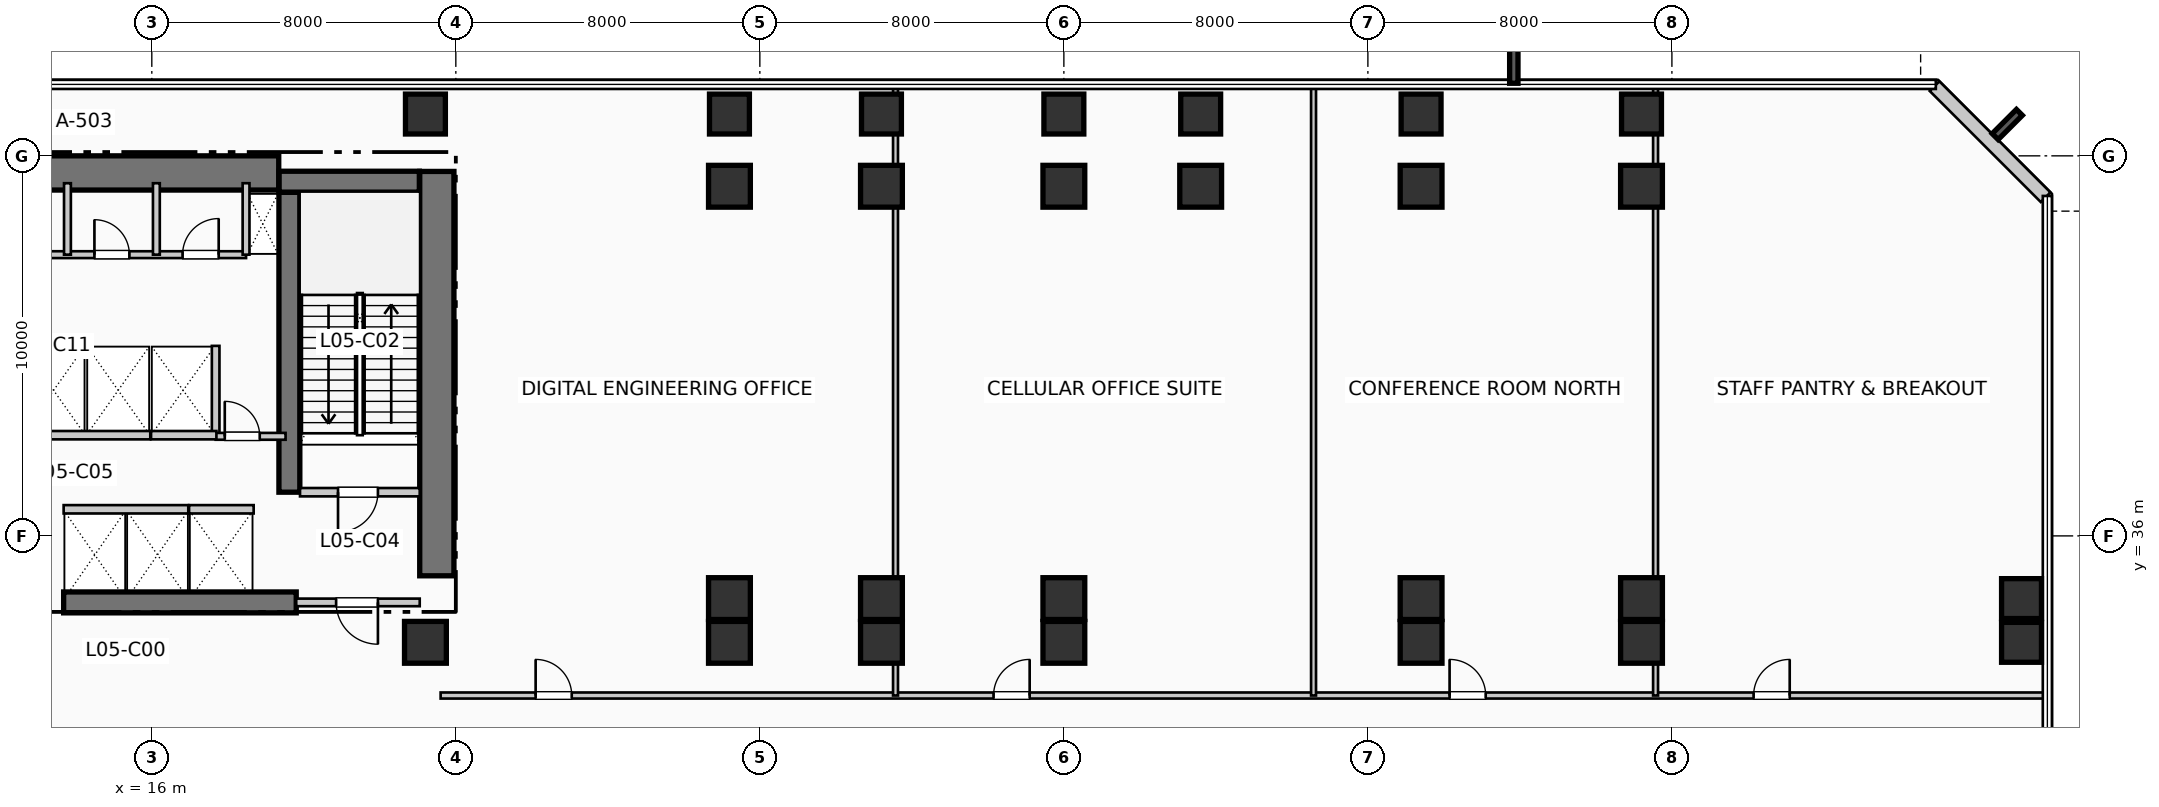
"""IFC4 building model, lengths in metres.
Left out: names, types, materials, properties, quantities, classifications, styles, units other than length and angle.
Written with IfcOpenShell. Run it as: python <this file> out.ifc"""

import sys

from ifc_helpers import new_model, si_unit, direction, frame, frame_2d, origin, origin_2d, place, context, subcontext, project, spatial, rectangle, extrude, element, fill, save


model = new_model("IFC4")
c1 = context("Model", 3, precision=1e-05, world=origin(), true_north=direction((0.0, 1.0)))
c2 = subcontext(c1, "Body", "Model", "MODEL_VIEW")
j1 = project(units=[si_unit("LENGTHUNIT", "METRE"), si_unit("PLANEANGLEUNIT", "RADIAN")], contexts=[c1])
p1 = place(None, origin())
s1 = spatial("IfcSite", under=j1, at=p1, CompositionType="ELEMENT")
p2 = place(p1, origin())
s2 = spatial("IfcBuilding", under=s1, at=p2, CompositionType="ELEMENT")
p3 = place(p2, frame((0.0, 0.0, 25.74)))
s3 = spatial("IfcBuildingStorey", under=s2, at=p3, CompositionType="ELEMENT", Elevation=25.74)
p4 = place(p3, frame((5.36, 45.55, 0.0), z_axis=(0.0, 0.0, 1.0), x_axis=(1.0, 0.0, 0.0)))
e1 = element("IfcWall", 1, at=p4, inside=s3, PredefinedType="SHEAR", context=c2, shape_type="SweptSolid", body=[
    extrude(rectangle(XDim=13.98, YDim=0.9, at=frame_2d((6.99, 0.0))), origin(), (0.0, 0.0, 1.0), 4.62),
])
p5 = place(p3, frame((23.5, 34.95, 0.0), z_axis=(0.0, 0.0, 1.0), x_axis=(0.0, 1.0, 0.0)))
e2 = element("IfcWall", 2, at=p5, inside=s3, PredefinedType="SHEAR", context=c2, shape_type="SweptSolid", body=[
    extrude(rectangle(XDim=10.64, YDim=0.9, at=frame_2d((5.32, 0.0))), origin(), (0.0, 0.0, 1.0), 4.62),
])
p6 = place(p3, frame((13.68, 34.25, 0.0), z_axis=(0.0, 0.0, 1.0), x_axis=(1.0, 0.0, 0.0)))
e3 = element("IfcWall", 3, at=p6, inside=s3, PredefinedType="SHEAR", context=c2, shape_type="SweptSolid", body=[
    extrude(rectangle(XDim=6.12, YDim=0.55, at=frame_2d((3.06, 0.0))), origin(), (0.0, 0.0, 1.0), 4.62),
])
p7 = place(p3, frame((19.62, 37.15, 0.0), z_axis=(0.0, 0.0, 1.0), x_axis=(0.0, 1.0, 0.0)))
e4 = element("IfcWall", 4, at=p7, inside=s3, PredefinedType="SHEAR", context=c2, shape_type="SweptSolid", body=[
    extrude(rectangle(XDim=7.89, YDim=0.55, at=frame_2d((3.945, 0.0))), origin(), (0.0, 0.0, 1.0), 4.62),
])
p8 = place(p3, frame((19.35, 45.32, 0.0), z_axis=(0.0, 0.0, 1.0), x_axis=(1.0, 0.0, 0.0)))
e5 = element("IfcWall", 5, at=p8, inside=s3, PredefinedType="SHEAR", context=c2, shape_type="SweptSolid", body=[
    extrude(rectangle(XDim=3.69, YDim=0.55, at=frame_2d((1.845, 0.0))), origin(), (0.0, 0.0, 1.0), 4.62),
])
p9 = place(p3, frame((23.2, 33.2, 0.0), z_axis=(0.0, 0.0, 1.0), x_axis=(1.0, 0.0, 0.0)))
e6 = element("IfcColumn", 6, at=p9, inside=s3, PredefinedType="COLUMN", context=c2, shape_type="SweptSolid", body=[
    extrude(rectangle(XDim=1.1, YDim=1.1, at=origin_2d()), origin(), (0.0, 0.0, 1.0), 4.62),
])
p10 = place(p3, frame((23.2, 47.1, 0.0), z_axis=(0.0, 0.0, 1.0), x_axis=(1.0, 0.0, 0.0)))
e7 = element("IfcColumn", 7, at=p10, inside=s3, PredefinedType="COLUMN", context=c2, shape_type="SweptSolid", body=[
    extrude(rectangle(XDim=1.05, YDim=1.05, at=origin_2d()), origin(), (0.0, 0.0, 1.0), 4.62),
])
for number, where, z_axis, x_axis in (
    (8, (31.2, 33.2, 0.0), (0.0, 0.0, 1.0), (1.0, 0.0, 0.0)),
    (9, (31.2, 34.35, 0.0), (0.0, 0.0, 1.0), (1.0, 0.0, 0.0)),
    (10, (31.2, 45.2, 0.0), (0.0, 0.0, 1.0), (1.0, 0.0, 0.0)),
):
    element("IfcColumn", number, at=place(p3, frame(where, z_axis=z_axis, x_axis=x_axis)), inside=s3, PredefinedType="COLUMN", context=c2, shape_type="SweptSolid", body=[
        extrude(rectangle(XDim=1.1, YDim=1.1, at=origin_2d()), origin(), (0.0, 0.0, 1.0), 4.62),
    ])
p11 = place(p3, frame((31.2, 47.1, 0.0), z_axis=(0.0, 0.0, 1.0), x_axis=(1.0, 0.0, 0.0)))
e11 = element("IfcColumn", 11, at=p11, inside=s3, PredefinedType="COLUMN", context=c2, shape_type="SweptSolid", body=[
    extrude(rectangle(XDim=1.05, YDim=1.05, at=origin_2d()), origin(), (0.0, 0.0, 1.0), 4.62),
])
for number, where, z_axis, x_axis in (
    (12, (35.2, 33.2, 0.0), (0.0, 0.0, 1.0), (1.0, 0.0, 0.0)),
    (13, (35.2, 34.35, 0.0), (0.0, 0.0, 1.0), (1.0, 0.0, 0.0)),
    (14, (35.2, 45.2, 0.0), (0.0, 0.0, 1.0), (1.0, 0.0, 0.0)),
):
    element("IfcColumn", number, at=place(p3, frame(where, z_axis=z_axis, x_axis=x_axis)), inside=s3, PredefinedType="COLUMN", context=c2, shape_type="SweptSolid", body=[
        extrude(rectangle(XDim=1.1, YDim=1.1, at=origin_2d()), origin(), (0.0, 0.0, 1.0), 4.62),
    ])
p12 = place(p3, frame((35.2, 47.1, 0.0), z_axis=(0.0, 0.0, 1.0), x_axis=(1.0, 0.0, 0.0)))
e15 = element("IfcColumn", 15, at=p12, inside=s3, PredefinedType="COLUMN", context=c2, shape_type="SweptSolid", body=[
    extrude(rectangle(XDim=1.05, YDim=1.05, at=origin_2d()), origin(), (0.0, 0.0, 1.0), 4.62),
])
for number, where, z_axis, x_axis in (
    (16, (40.0, 33.2, 0.0), (0.0, 0.0, 1.0), (1.0, 0.0, 0.0)),
    (17, (40.0, 34.35, 0.0), (0.0, 0.0, 1.0), (1.0, 0.0, 0.0)),
    (18, (40.0, 45.2, 0.0), (0.0, 0.0, 1.0), (1.0, 0.0, 0.0)),
):
    element("IfcColumn", number, at=place(p3, frame(where, z_axis=z_axis, x_axis=x_axis)), inside=s3, PredefinedType="COLUMN", context=c2, shape_type="SweptSolid", body=[
        extrude(rectangle(XDim=1.1, YDim=1.1, at=origin_2d()), origin(), (0.0, 0.0, 1.0), 4.62),
    ])
p13 = place(p3, frame((40.0, 47.1, 0.0), z_axis=(0.0, 0.0, 1.0), x_axis=(1.0, 0.0, 0.0)))
e19 = element("IfcColumn", 19, at=p13, inside=s3, PredefinedType="COLUMN", context=c2, shape_type="SweptSolid", body=[
    extrude(rectangle(XDim=1.05, YDim=1.05, at=origin_2d()), origin(), (0.0, 0.0, 1.0), 4.62),
])
p14 = place(p3, frame((43.6, 45.2, 0.0), z_axis=(0.0, 0.0, 1.0), x_axis=(1.0, 0.0, 0.0)))
e20 = element("IfcColumn", 20, at=p14, inside=s3, PredefinedType="COLUMN", context=c2, shape_type="SweptSolid", body=[
    extrude(rectangle(XDim=1.1, YDim=1.1, at=origin_2d()), origin(), (0.0, 0.0, 1.0), 4.62),
])
p15 = place(p3, frame((43.6, 47.1, 0.0), z_axis=(0.0, 0.0, 1.0), x_axis=(1.0, 0.0, 0.0)))
e21 = element("IfcColumn", 21, at=p15, inside=s3, PredefinedType="COLUMN", context=c2, shape_type="SweptSolid", body=[
    extrude(rectangle(XDim=1.05, YDim=1.05, at=origin_2d()), origin(), (0.0, 0.0, 1.0), 4.62),
])
for number, where, z_axis, x_axis in (
    (22, (49.4, 33.2, 0.0), (0.0, 0.0, 1.0), (1.0, 0.0, 0.0)),
    (23, (49.4, 34.35, 0.0), (0.0, 0.0, 1.0), (1.0, 0.0, 0.0)),
    (24, (49.4, 45.2, 0.0), (0.0, 0.0, 1.0), (1.0, 0.0, 0.0)),
):
    element("IfcColumn", number, at=place(p3, frame(where, z_axis=z_axis, x_axis=x_axis)), inside=s3, PredefinedType="COLUMN", context=c2, shape_type="SweptSolid", body=[
        extrude(rectangle(XDim=1.1, YDim=1.1, at=origin_2d()), origin(), (0.0, 0.0, 1.0), 4.62),
    ])
p16 = place(p3, frame((49.4, 47.1, 0.0), z_axis=(0.0, 0.0, 1.0), x_axis=(1.0, 0.0, 0.0)))
e25 = element("IfcColumn", 25, at=p16, inside=s3, PredefinedType="COLUMN", context=c2, shape_type="SweptSolid", body=[
    extrude(rectangle(XDim=1.05, YDim=1.05, at=origin_2d()), origin(), (0.0, 0.0, 1.0), 4.62),
])
for number, where, z_axis, x_axis in (
    (26, (55.2, 33.2, 0.0), (0.0, 0.0, 1.0), (1.0, 0.0, 0.0)),
    (27, (55.2, 34.35, 0.0), (0.0, 0.0, 1.0), (1.0, 0.0, 0.0)),
    (28, (55.2, 45.2, 0.0), (0.0, 0.0, 1.0), (1.0, 0.0, 0.0)),
):
    element("IfcColumn", number, at=place(p3, frame(where, z_axis=z_axis, x_axis=x_axis)), inside=s3, PredefinedType="COLUMN", context=c2, shape_type="SweptSolid", body=[
        extrude(rectangle(XDim=1.1, YDim=1.1, at=origin_2d()), origin(), (0.0, 0.0, 1.0), 4.62),
    ])
for number, where, z_axis, x_axis in (
    (29, (55.2, 47.1, 0.0), (0.0, 0.0, 1.0), (1.0, 0.0, 0.0)),
    (30, (65.2, 33.2, 0.0), (0.0, 0.0, 1.0), (1.0, 0.0, 0.0)),
    (31, (65.2, 34.35, 0.0), (0.0, 0.0, 1.0), (1.0, 0.0, 0.0)),
):
    element("IfcColumn", number, at=place(p3, frame(where, z_axis=z_axis, x_axis=x_axis)), inside=s3, PredefinedType="COLUMN", context=c2, shape_type="SweptSolid", body=[
        extrude(rectangle(XDim=1.05, YDim=1.05, at=origin_2d()), origin(), (0.0, 0.0, 1.0), 4.62),
    ])
p17 = place(p3, frame((65.834, 44.912, 0.0), z_axis=(0.0, 0.0, 1.0), x_axis=(-0.707106781187, 0.707106781187, 0.0)))
e32 = element("IfcWall", 32, at=p17, inside=s3, PredefinedType="SOLIDWALL", context=c2, shape_type="SweptSolid", body=[
    extrude(rectangle(XDim=4.133, YDim=0.36, at=frame_2d((2.066, 0.0))), origin(), (0.0, 0.0, 1.0), 4.37),
])
p18 = place(p3, frame((19.9, 37.15, 0.0), z_axis=(0.0, 0.0, 1.0), x_axis=(1.0, 0.0, 0.0)))
e33 = element("IfcWall", 33, at=p18, inside=s3, PredefinedType="PARTITIONING", context=c2, shape_type="SweptSolid", body=[
    extrude(rectangle(XDim=3.15, YDim=0.22, at=frame_2d((1.575, 0.0))), origin(), (0.0, 0.0, 1.0), 4.37),
])
p19 = place(p18, frame((2.05, 0.0, 0.0), z_axis=(0.0, 0.0, 1.0), x_axis=(-1.0, 0.0, 0.0)))
e34 = element("IfcOpeningElement", 34, at=p19, cuts=e33, PredefinedType="OPENING", context=c2, shape_type="SweptSolid", body=[
    extrude(rectangle(XDim=1.05, YDim=2.15, at=frame_2d((0.525, 1.075))), frame((0.0, 0.12, 0.0), z_axis=(0.0, -1.0, 0.0), x_axis=(1.0, 0.0, 0.0)), (0.0, 0.0, 1.0), 0.24),
])
p20 = place(p3, frame((19.8, 34.25, 0.0), z_axis=(0.0, 0.0, 1.0), x_axis=(1.0, 0.0, 0.0)))
e35 = element("IfcWall", 35, at=p20, inside=s3, PredefinedType="PARTITIONING", context=c2, shape_type="SweptSolid", body=[
    extrude(rectangle(XDim=3.25, YDim=0.2, at=frame_2d((1.625, 0.0))), origin(), (0.0, 0.0, 1.0), 4.37),
])
p21 = place(p20, frame((2.15, 0.0, 0.0), z_axis=(0.0, 0.0, 1.0), x_axis=(-1.0, 0.0, 0.0)))
e36 = element("IfcOpeningElement", 36, at=p21, cuts=e35, PredefinedType="OPENING", context=c2, shape_type="SweptSolid", body=[
    extrude(rectangle(XDim=1.1, YDim=2.15, at=frame_2d((0.55, 1.075))), frame((0.0, 0.11, 0.0), z_axis=(0.0, -1.0, 0.0), x_axis=(1.0, 0.0, 0.0)), (0.0, 0.0, 1.0), 0.22),
])
p22 = place(p3, frame((17.68, 38.65, 0.0), z_axis=(0.0, 0.0, 1.0), x_axis=(0.0, 1.0, 0.0)))
e37 = element("IfcWall", 37, at=p22, inside=s3, PredefinedType="PARTITIONING", context=c2, shape_type="SweptSolid", body=[
    extrude(rectangle(XDim=2.35, YDim=0.2, at=frame_2d((1.175, 0.0))), origin(), (0.0, 0.0, 1.0), 4.37),
])
p23 = place(p3, frame((17.68, 38.62, 0.0), z_axis=(0.0, 0.0, 1.0), x_axis=(1.0, 0.0, 0.0)))
e38 = element("IfcWall", 38, at=p23, inside=s3, PredefinedType="PARTITIONING", context=c2, shape_type="SweptSolid", body=[
    extrude(rectangle(XDim=1.84, YDim=0.18, at=frame_2d((0.92, 0.0))), origin(), (0.0, 0.0, 1.0), 4.37),
])
p24 = place(p23, frame((0.24, 0.0, 0.0)))
e39 = element("IfcOpeningElement", 39, at=p24, cuts=e38, PredefinedType="OPENING", context=c2, shape_type="SweptSolid", body=[
    extrude(rectangle(XDim=0.92, YDim=2.1, at=frame_2d((0.46, 1.05))), frame((0.0, 0.1, 0.0), z_axis=(0.0, -1.0, 0.0), x_axis=(1.0, 0.0, 0.0)), (0.0, 0.0, 1.0), 0.2),
])
p25 = place(p3, frame((13.68, 36.7, 0.0), z_axis=(0.0, 0.0, 1.0), x_axis=(1.0, 0.0, 0.0)))
e40 = element("IfcWall", 40, at=p25, inside=s3, PredefinedType="PARTITIONING", context=c2, shape_type="SweptSolid", body=[
    extrude(rectangle(XDim=3.28, YDim=0.22, at=frame_2d((1.64, 0.0))), origin(), (0.0, 0.0, 1.0), 4.37),
])
p26 = place(p3, frame((12.58, 38.65, 0.0), z_axis=(0.0, 0.0, 1.0), x_axis=(1.0, 0.0, 0.0)))
e41 = element("IfcWall", 41, at=p26, inside=s3, PredefinedType="PARTITIONING", context=c2, shape_type="SweptSolid", body=[
    extrude(rectangle(XDim=3.38, YDim=0.22, at=frame_2d((1.69, 0.0))), origin(), (0.0, 0.0, 1.0), 4.37),
])
p27 = place(p3, frame((16.98, 36.7, 0.0), z_axis=(0.0, 0.0, 1.0), x_axis=(1.0, 0.0, 0.0)))
e42 = element("IfcWall", 42, at=p27, inside=s3, PredefinedType="PARTITIONING", context=c2, shape_type="SweptSolid", body=[
    extrude(rectangle(XDim=1.7, YDim=0.22, at=frame_2d((0.85, 0.0))), origin(), (0.0, 0.0, 1.0), 4.37),
])
p28 = place(p3, frame((15.98, 38.65, 0.0), z_axis=(0.0, 0.0, 1.0), x_axis=(1.0, 0.0, 0.0)))
e43 = element("IfcWall", 43, at=p28, inside=s3, PredefinedType="PARTITIONING", context=c2, shape_type="SweptSolid", body=[
    extrude(rectangle(XDim=1.72, YDim=0.22, at=frame_2d((0.86, 0.0))), origin(), (0.0, 0.0, 1.0), 4.37),
])
p29 = place(p3, frame((9.15, 43.4, 0.0), z_axis=(0.0, 0.0, 1.0), x_axis=(1.0, 0.0, 0.0)))
e44 = element("IfcWall", 44, at=p29, inside=s3, PredefinedType="PLUMBINGWALL", context=c2, shape_type="SweptSolid", body=[
    extrude(rectangle(XDim=9.33, YDim=0.18, at=frame_2d((4.665, 0.0))), origin(), (0.0, 0.0, 1.0), 4.37),
])
p30 = place(p29, frame((0.72, 0.0, 0.0)))
e45 = element("IfcOpeningElement", 45, at=p30, cuts=e44, PredefinedType="OPENING", context=c2, shape_type="SweptSolid", body=[
    extrude(rectangle(XDim=0.92, YDim=2.1, at=frame_2d((0.46, 1.05))), frame((0.0, 0.1, 0.0), z_axis=(0.0, -1.0, 0.0), x_axis=(1.0, 0.0, 0.0)), (0.0, 0.0, 1.0), 0.2),
])
p31 = place(p29, frame((3.02, 0.0, 0.0)))
e46 = element("IfcOpeningElement", 46, at=p31, cuts=e44, PredefinedType="OPENING", context=c2, shape_type="SweptSolid", body=[
    extrude(rectangle(XDim=0.92, YDim=2.1, at=frame_2d((0.46, 1.05))), frame((0.0, 0.1, 0.0), z_axis=(0.0, -1.0, 0.0), x_axis=(1.0, 0.0, 0.0)), (0.0, 0.0, 1.0), 0.2),
])
p32 = place(p29, frame((5.34, 0.0, 0.0)))
e47 = element("IfcOpeningElement", 47, at=p32, cuts=e44, PredefinedType="OPENING", context=c2, shape_type="SweptSolid", body=[
    extrude(rectangle(XDim=0.92, YDim=2.1, at=frame_2d((0.46, 1.05))), frame((0.0, 0.1, 0.0), z_axis=(0.0, -1.0, 0.0), x_axis=(1.0, 0.0, 0.0)), (0.0, 0.0, 1.0), 0.2),
])
p33 = place(p29, frame((7.66, 0.0, 0.0)))
e48 = element("IfcOpeningElement", 48, at=p33, cuts=e44, PredefinedType="OPENING", context=c2, shape_type="SweptSolid", body=[
    extrude(rectangle(XDim=0.95, YDim=2.1, at=frame_2d((0.475, 1.05))), frame((0.0, 0.1, 0.0), z_axis=(0.0, -1.0, 0.0), x_axis=(1.0, 0.0, 0.0)), (0.0, 0.0, 1.0), 0.2),
])
for number, where, z_axis, x_axis in (
    (49, (18.48, 43.4, 0.0), (0.0, 0.0, 1.0), (0.0, 1.0, 0.0)),
    (50, (13.78, 43.4, 0.0), (0.0, 0.0, 1.0), (0.0, 1.0, 0.0)),
    (51, (16.12, 43.4, 0.0), (0.0, 0.0, 1.0), (0.0, 1.0, 0.0)),
):
    element("IfcWall", number, at=place(p3, frame(where, z_axis=z_axis, x_axis=x_axis)), inside=s3, PredefinedType="PLUMBINGWALL", context=c2, shape_type="SweptSolid", body=[
        extrude(rectangle(XDim=1.88, YDim=0.18, at=frame_2d((0.94, 0.0))), origin(), (0.0, 0.0, 1.0), 4.37),
    ])
p34 = place(p3, frame((23.6, 31.8, 0.0), z_axis=(0.0, 0.0, 1.0), x_axis=(1.0, 0.0, 0.0)))
e52 = element("IfcWall", 52, at=p34, inside=s3, PredefinedType="PARTITIONING", context=c2, shape_type="SweptSolid", body=[
    extrude(rectangle(XDim=42.21, YDim=0.16, at=frame_2d((21.105, 0.0))), origin(), (0.0, 0.0, 1.0), 4.37),
])
p35 = place(p34, frame((2.5, 0.0, 0.0)))
e53 = element("IfcOpeningElement", 53, at=p35, cuts=e52, PredefinedType="OPENING", context=c2, shape_type="SweptSolid", body=[
    extrude(rectangle(XDim=0.95, YDim=2.15, at=frame_2d((0.475, 1.075))), frame((0.0, 0.09, 0.0), z_axis=(0.0, -1.0, 0.0), x_axis=(1.0, 0.0, 0.0)), (0.0, 0.0, 1.0), 0.18),
])
p36 = place(p34, frame((14.55, 0.0, 0.0)))
e54 = element("IfcOpeningElement", 54, at=p36, cuts=e52, PredefinedType="OPENING", context=c2, shape_type="SweptSolid", body=[
    extrude(rectangle(XDim=0.95, YDim=2.15, at=frame_2d((0.475, 1.075))), frame((0.0, 0.09, 0.0), z_axis=(0.0, -1.0, 0.0), x_axis=(1.0, 0.0, 0.0)), (0.0, 0.0, 1.0), 0.18),
])
p37 = place(p34, frame((26.55, 0.0, 0.0)))
e55 = element("IfcOpeningElement", 55, at=p37, cuts=e52, PredefinedType="OPENING", context=c2, shape_type="SweptSolid", body=[
    extrude(rectangle(XDim=0.95, YDim=2.15, at=frame_2d((0.475, 1.075))), frame((0.0, 0.09, 0.0), z_axis=(0.0, -1.0, 0.0), x_axis=(1.0, 0.0, 0.0)), (0.0, 0.0, 1.0), 0.18),
])
p38 = place(p34, frame((34.55, 0.0, 0.0)))
e56 = element("IfcOpeningElement", 56, at=p38, cuts=e52, PredefinedType="OPENING", context=c2, shape_type="SweptSolid", body=[
    extrude(rectangle(XDim=0.95, YDim=2.15, at=frame_2d((0.475, 1.075))), frame((0.0, 0.09, 0.0), z_axis=(0.0, -1.0, 0.0), x_axis=(1.0, 0.0, 0.0)), (0.0, 0.0, 1.0), 0.18),
])
p39 = place(p3, frame((35.57, 31.8, 0.0), z_axis=(0.0, 0.0, 1.0), x_axis=(0.0, 1.0, 0.0)))
e57 = element("IfcWall", 57, at=p39, inside=s3, PredefinedType="PARTITIONING", context=c2, shape_type="SweptSolid", body=[
    extrude(rectangle(XDim=16.01, YDim=0.13, at=frame_2d((8.005, 0.0))), origin(), (0.0, 0.0, 1.0), 3.555),
])
p40 = place(p3, frame((46.57, 31.8, 0.0), z_axis=(0.0, 0.0, 1.0), x_axis=(0.0, 1.0, 0.0)))
e58 = element("IfcWall", 58, at=p40, inside=s3, PredefinedType="PARTITIONING", context=c2, shape_type="SweptSolid", body=[
    extrude(rectangle(XDim=16.01, YDim=0.13, at=frame_2d((8.005, 0.0))), origin(), (0.0, 0.0, 1.0), 4.37),
])
p41 = place(p3, frame((55.57, 31.8, 0.0), z_axis=(0.0, 0.0, 1.0), x_axis=(0.0, 1.0, 0.0)))
e59 = element("IfcWall", 59, at=p41, inside=s3, PredefinedType="PARTITIONING", context=c2, shape_type="SweptSolid", body=[
    extrude(rectangle(XDim=16.01, YDim=0.13, at=frame_2d((8.005, 0.0))), origin(), (0.0, 0.0, 1.0), 3.555),
])
p42 = place(p19, origin())
e60 = element("IfcDoor", 60, at=p42, inside=s3, OperationType="SINGLE_SWING_LEFT", PredefinedType="DOOR", context=c2, shape_type="SweptSolid", body=[
    extrude(rectangle(XDim=1.05, YDim=2.15, at=frame_2d((0.525, 1.075))), frame((0.0, 0.025, 0.0), z_axis=(0.0, -1.0, 0.0), x_axis=(1.0, 0.0, 0.0)), (0.0, 0.0, 1.0), 0.05),
])
fill(e34, e60)
p43 = place(p21, origin())
e61 = element("IfcDoor", 61, at=p43, inside=s3, OperationType="SINGLE_SWING_RIGHT", PredefinedType="DOOR", context=c2, shape_type="SweptSolid", body=[
    extrude(rectangle(XDim=1.1, YDim=2.15, at=frame_2d((0.55, 1.075))), frame((0.0, 0.025, 0.0), z_axis=(0.0, -1.0, 0.0), x_axis=(1.0, 0.0, 0.0)), (0.0, 0.0, 1.0), 0.05),
])
fill(e36, e61)
p44 = place(p24, origin())
e62 = element("IfcDoor", 62, at=p44, inside=s3, OperationType="SINGLE_SWING_LEFT", PredefinedType="DOOR", context=c2, shape_type="SweptSolid", body=[
    extrude(rectangle(XDim=0.92, YDim=2.1, at=frame_2d((0.46, 1.05))), frame((0.0, 0.025, 0.0), z_axis=(0.0, -1.0, 0.0), x_axis=(1.0, 0.0, 0.0)), (0.0, 0.0, 1.0), 0.05),
])
fill(e39, e62)
p45 = place(p32, origin())
e63 = element("IfcDoor", 63, at=p45, inside=s3, OperationType="SINGLE_SWING_LEFT", PredefinedType="DOOR", context=c2, shape_type="SweptSolid", body=[
    extrude(rectangle(XDim=0.92, YDim=2.1, at=frame_2d((0.46, 1.05))), frame((0.0, 0.025, 0.0), z_axis=(0.0, -1.0, 0.0), x_axis=(1.0, 0.0, 0.0)), (0.0, 0.0, 1.0), 0.05),
])
fill(e47, e63)
p46 = place(p33, origin())
e64 = element("IfcDoor", 64, at=p46, inside=s3, OperationType="SINGLE_SWING_RIGHT", PredefinedType="DOOR", context=c2, shape_type="SweptSolid", body=[
    extrude(rectangle(XDim=0.95, YDim=2.1, at=frame_2d((0.475, 1.05))), frame((0.0, 0.025, 0.0), z_axis=(0.0, -1.0, 0.0), x_axis=(1.0, 0.0, 0.0)), (0.0, 0.0, 1.0), 0.05),
])
fill(e48, e64)
p47 = place(p35, origin())
e65 = element("IfcDoor", 65, at=p47, inside=s3, OperationType="SINGLE_SWING_LEFT", PredefinedType="DOOR", context=c2, shape_type="SweptSolid", body=[
    extrude(rectangle(XDim=0.95, YDim=2.15, at=frame_2d((0.475, 1.075))), frame((0.0, 0.025, 0.0), z_axis=(0.0, -1.0, 0.0), x_axis=(1.0, 0.0, 0.0)), (0.0, 0.0, 1.0), 0.05),
])
fill(e53, e65)
p48 = place(p36, origin())
e66 = element("IfcDoor", 66, at=p48, inside=s3, OperationType="SINGLE_SWING_RIGHT", PredefinedType="DOOR", context=c2, shape_type="SweptSolid", body=[
    extrude(rectangle(XDim=0.95, YDim=2.15, at=frame_2d((0.475, 1.075))), frame((0.0, 0.025, 0.0), z_axis=(0.0, -1.0, 0.0), x_axis=(1.0, 0.0, 0.0)), (0.0, 0.0, 1.0), 0.05),
])
fill(e54, e66)
p49 = place(p37, origin())
e67 = element("IfcDoor", 67, at=p49, inside=s3, OperationType="SINGLE_SWING_LEFT", PredefinedType="DOOR", context=c2, shape_type="SweptSolid", body=[
    extrude(rectangle(XDim=0.95, YDim=2.15, at=frame_2d((0.475, 1.075))), frame((0.0, 0.025, 0.0), z_axis=(0.0, -1.0, 0.0), x_axis=(1.0, 0.0, 0.0)), (0.0, 0.0, 1.0), 0.05),
])
fill(e55, e67)
p50 = place(p38, origin())
e68 = element("IfcDoor", 68, at=p50, inside=s3, OperationType="SINGLE_SWING_RIGHT", PredefinedType="DOOR", context=c2, shape_type="SweptSolid", body=[
    extrude(rectangle(XDim=0.95, YDim=2.15, at=frame_2d((0.475, 1.075))), frame((0.0, 0.025, 0.0), z_axis=(0.0, -1.0, 0.0), x_axis=(1.0, 0.0, 0.0)), (0.0, 0.0, 1.0), 0.05),
])
fill(e56, e68)
save(model, sys.argv[1])
